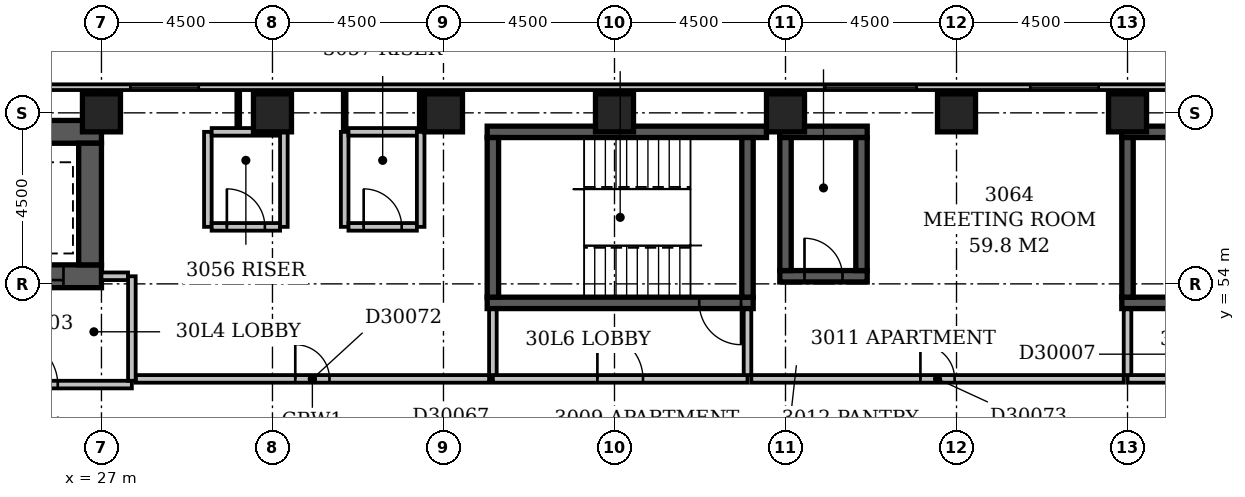
"""IFC4 building model, lengths in metres.
Left out: names, types, materials, properties, quantities, classifications, styles, units other than length and angle.
Written with IfcOpenShell. Run it as: python <this file> out.ifc"""

import sys

from ifc_helpers import new_model, si_unit, direction, frame, frame_2d, origin, origin_2d, place, context, subcontext, project, spatial, rectangle, extrude, element, fill, save


model = new_model("IFC4")
c1 = context("Model", 3, precision=1e-05, world=origin(), true_north=direction((0.0, 1.0)))
c2 = subcontext(c1, "Body", "Model", "MODEL_VIEW")
j1 = project(units=[si_unit("LENGTHUNIT", "METRE"), si_unit("PLANEANGLEUNIT", "RADIAN")], contexts=[c1])
p1 = place(None, origin())
s1 = spatial("IfcSite", under=j1, at=p1, CompositionType="ELEMENT")
p2 = place(p1, origin())
s2 = spatial("IfcBuilding", under=s1, at=p2, CompositionType="ELEMENT")
p3 = place(p2, frame((0.0, 0.0, 123.2)))
s3 = spatial("IfcBuildingStorey", under=s2, at=p3, CompositionType="ELEMENT", Elevation=123.2)
p4 = place(p3, frame((23.9, 54.2, -0.3), z_axis=(0.0, 0.0, 1.0), x_axis=(1.0, 0.0, 0.0)))
e1 = element("IfcWall", 1, at=p4, inside=s3, PredefinedType="SHEAR", context=c2, shape_type="SweptSolid", body=[
    extrude(rectangle(XDim=3.1, YDim=0.6, at=frame_2d((1.55, 0.0))), origin(), (0.0, 0.0, 1.0), 3.6),
])
p5 = place(p4, frame((1.0, 0.0, 0.3)))
e2 = element("IfcOpeningElement", 2, at=p5, cuts=e1, PredefinedType="OPENING", context=c2, shape_type="SweptSolid", body=[
    extrude(rectangle(XDim=1.1, YDim=2.1, at=frame_2d((0.55, 1.05))), frame((0.0, 0.312, 0.0), z_axis=(0.0, -1.0, 0.0), x_axis=(1.0, 0.0, 0.0)), (0.0, 0.0, 1.0), 0.624),
])
p6 = place(p3, frame((23.9, 58.0, -0.3), z_axis=(0.0, 0.0, 1.0), x_axis=(1.0, 0.0, 0.0)))
e3 = element("IfcWall", 3, at=p6, inside=s3, PredefinedType="SHEAR", context=c2, shape_type="SweptSolid", body=[
    extrude(rectangle(XDim=3.1, YDim=0.6, at=frame_2d((1.55, 0.0))), origin(), (0.0, 0.0, 1.0), 3.6),
])
p7 = place(p3, frame((26.7, 54.5, -0.3), z_axis=(0.0, 0.0, 1.0), x_axis=(0.0, 1.0, 0.0)))
e4 = element("IfcWall", 4, at=p7, inside=s3, PredefinedType="SHEAR", context=c2, shape_type="SweptSolid", body=[
    extrude(rectangle(XDim=3.2, YDim=0.6, at=frame_2d((1.6, 0.0))), origin(), (0.0, 0.0, 1.0), 3.6),
])
p8 = place(p3, frame((37.15, 53.5, -0.3), z_axis=(0.0, 0.0, 1.0), x_axis=(1.0, 0.0, 0.0)))
e5 = element("IfcWall", 5, at=p8, inside=s3, PredefinedType="SHEAR", context=c2, shape_type="SweptSolid", body=[
    extrude(rectangle(XDim=7.0, YDim=0.3, at=frame_2d((3.5, 0.0))), origin(), (0.0, 0.0, 1.0), 3.6),
])
p9 = place(p8, frame((5.58, 0.0, 0.3)))
e6 = element("IfcOpeningElement", 6, at=p9, cuts=e5, PredefinedType="OPENING", context=c2, shape_type="SweptSolid", body=[
    extrude(rectangle(XDim=1.1, YDim=2.1, at=frame_2d((0.55, 1.05))), frame((0.0, 0.162, 0.0), z_axis=(0.0, -1.0, 0.0), x_axis=(1.0, 0.0, 0.0)), (0.0, 0.0, 1.0), 0.324),
])
p10 = place(p3, frame((37.15, 58.0, -0.3), z_axis=(0.0, 0.0, 1.0), x_axis=(1.0, 0.0, 0.0)))
e7 = element("IfcWall", 7, at=p10, inside=s3, PredefinedType="SHEAR", context=c2, shape_type="SweptSolid", body=[
    extrude(rectangle(XDim=7.35, YDim=0.3, at=frame_2d((3.675, 0.0))), origin(), (0.0, 0.0, 1.0), 3.6),
])
for number, where, z_axis, x_axis in (
    (8, (37.3, 53.65, -0.3), (0.0, 0.0, 1.0), (0.0, 1.0, 0.0)),
    (9, (44.0, 53.65, -0.3), (0.0, 0.0, 1.0), (0.0, 1.0, 0.0)),
):
    element("IfcWall", number, at=place(p3, frame(where, z_axis=z_axis, x_axis=x_axis)), inside=s3, PredefinedType="SHEAR", context=c2, shape_type="SweptSolid", body=[
        extrude(rectangle(XDim=4.2, YDim=0.3, at=frame_2d((2.1, 0.0))), origin(), (0.0, 0.0, 1.0), 3.6),
    ])
p11 = place(p3, frame((44.85, 54.2, -0.3), z_axis=(0.0, 0.0, 1.0), x_axis=(1.0, 0.0, 0.0)))
e10 = element("IfcWall", 10, at=p11, inside=s3, PredefinedType="SHEAR", context=c2, shape_type="SweptSolid", body=[
    extrude(rectangle(XDim=2.3, YDim=0.3, at=frame_2d((1.15, 0.0))), origin(), (0.0, 0.0, 1.0), 3.6),
])
p12 = place(p11, frame((0.65, 0.0, 0.3)))
e11 = element("IfcOpeningElement", 11, at=p12, cuts=e10, PredefinedType="OPENING", context=c2, shape_type="SweptSolid", body=[
    extrude(rectangle(XDim=1.0, YDim=2.1, at=frame_2d((0.5, 1.05))), frame((0.0, 0.162, 0.0), z_axis=(0.0, -1.0, 0.0), x_axis=(1.0, 0.0, 0.0)), (0.0, 0.0, 1.0), 0.324),
])
p13 = place(p3, frame((44.85, 58.0, -0.3), z_axis=(0.0, 0.0, 1.0), x_axis=(1.0, 0.0, 0.0)))
e12 = element("IfcWall", 12, at=p13, inside=s3, PredefinedType="SHEAR", context=c2, shape_type="SweptSolid", body=[
    extrude(rectangle(XDim=2.3, YDim=0.3, at=frame_2d((1.15, 0.0))), origin(), (0.0, 0.0, 1.0), 3.6),
])
for number, where, z_axis, x_axis in (
    (13, (45.0, 54.35, -0.3), (0.0, 0.0, 1.0), (0.0, 1.0, 0.0)),
    (14, (47.0, 54.35, -0.3), (0.0, 0.0, 1.0), (0.0, 1.0, 0.0)),
):
    element("IfcWall", number, at=place(p3, frame(where, z_axis=z_axis, x_axis=x_axis)), inside=s3, PredefinedType="SHEAR", context=c2, shape_type="SweptSolid", body=[
        extrude(rectangle(XDim=3.5, YDim=0.3, at=frame_2d((1.75, 0.0))), origin(), (0.0, 0.0, 1.0), 3.6),
    ])
p14 = place(p3, frame((53.85, 53.5, -0.3), z_axis=(0.0, 0.0, 1.0), x_axis=(1.0, 0.0, 0.0)))
e15 = element("IfcWall", 15, at=p14, inside=s3, PredefinedType="SHEAR", context=c2, shape_type="SweptSolid", body=[
    extrude(rectangle(XDim=7.0, YDim=0.3, at=frame_2d((3.5, 0.0))), origin(), (0.0, 0.0, 1.0), 3.6),
])
p15 = place(p14, frame((5.58, 0.0, 0.3)))
e16 = element("IfcOpeningElement", 16, at=p15, cuts=e15, PredefinedType="OPENING", context=c2, shape_type="SweptSolid", body=[
    extrude(rectangle(XDim=1.1, YDim=2.1, at=frame_2d((0.55, 1.05))), frame((0.0, 0.162, 0.0), z_axis=(0.0, -1.0, 0.0), x_axis=(1.0, 0.0, 0.0)), (0.0, 0.0, 1.0), 0.324),
])
p16 = place(p3, frame((53.85, 58.0, -0.3), z_axis=(0.0, 0.0, 1.0), x_axis=(1.0, 0.0, 0.0)))
e17 = element("IfcWall", 17, at=p16, inside=s3, PredefinedType="SHEAR", context=c2, shape_type="SweptSolid", body=[
    extrude(rectangle(XDim=7.0, YDim=0.3, at=frame_2d((3.5, 0.0))), origin(), (0.0, 0.0, 1.0), 3.6),
])
p17 = place(p3, frame((54.0, 53.65, -0.3), z_axis=(0.0, 0.0, 1.0), x_axis=(0.0, 1.0, 0.0)))
e18 = element("IfcWall", 18, at=p17, inside=s3, PredefinedType="SHEAR", context=c2, shape_type="SweptSolid", body=[
    extrude(rectangle(XDim=4.2, YDim=0.3, at=frame_2d((2.1, 0.0))), origin(), (0.0, 0.0, 1.0), 3.6),
])
for number, where, z_axis, x_axis in (
    (19, (27.0, 58.5, -0.3), (0.0, 0.0, 1.0), (1.0, 0.0, 0.0)),
    (20, (31.5, 58.5, -0.3), (0.0, 0.0, 1.0), (1.0, 0.0, 0.0)),
    (21, (36.0, 58.5, -0.3), (0.0, 0.0, 1.0), (1.0, 0.0, 0.0)),
    (22, (40.5, 58.5, -0.3), (0.0, 0.0, 1.0), (1.0, 0.0, 0.0)),
    (23, (45.0, 58.5, -0.3), (0.0, 0.0, 1.0), (1.0, 0.0, 0.0)),
    (24, (49.5, 58.5, -0.3), (0.0, 0.0, 1.0), (1.0, 0.0, 0.0)),
    (25, (54.0, 58.5, -0.3), (0.0, 0.0, 1.0), (1.0, 0.0, 0.0)),
):
    element("IfcColumn", number, at=place(p3, frame(where, z_axis=z_axis, x_axis=x_axis)), inside=s3, PredefinedType="COLUMN", context=c2, shape_type="SweptSolid", body=[
        extrude(rectangle(XDim=1.0, YDim=1.0, at=origin_2d()), origin(), (0.0, 0.0, 1.0), 3.6),
    ])
p18 = place(p3, frame((68.1, 59.175, 0.0), z_axis=(0.0, 0.0, 1.0), x_axis=(-1.0, 0.0, 0.0)))
e26 = element("IfcWall", 26, at=p18, inside=s3, PredefinedType="STANDARD", context=c2, shape_type="SweptSolid", body=[
    extrude(rectangle(XDim=68.85, YDim=0.15, at=frame_2d((34.425, 0.0))), origin(), (0.0, 0.0, 1.0), 2.7),
])
p19 = place(p18, frame((1.65, 0.0, 0.6)))
e27 = element("IfcOpeningElement", 27, at=p19, cuts=e26, PredefinedType="OPENING", context=c2, shape_type="SweptSolid", body=[
    extrude(rectangle(XDim=2.4, YDim=1.8, at=frame_2d((1.2, 0.9))), frame((0.0, 0.087, 0.0), z_axis=(0.0, -1.0, 0.0), x_axis=(1.0, 0.0, 0.0)), (0.0, 0.0, 1.0), 0.174),
])
p20 = place(p18, frame((6.15, 0.0, 0.6)))
e28 = element("IfcOpeningElement", 28, at=p20, cuts=e26, PredefinedType="OPENING", context=c2, shape_type="SweptSolid", body=[
    extrude(rectangle(XDim=2.4, YDim=1.8, at=frame_2d((1.2, 0.9))), frame((0.0, 0.087, 0.0), z_axis=(0.0, -1.0, 0.0), x_axis=(1.0, 0.0, 0.0)), (0.0, 0.0, 1.0), 0.174),
])
p21 = place(p18, frame((14.86, 0.0, 0.6)))
e29 = element("IfcOpeningElement", 29, at=p21, cuts=e26, PredefinedType="OPENING", context=c2, shape_type="SweptSolid", body=[
    extrude(rectangle(XDim=1.8, YDim=1.8, at=frame_2d((0.9, 0.9))), frame((0.0, 0.087, 0.0), z_axis=(0.0, -1.0, 0.0), x_axis=(1.0, 0.0, 0.0)), (0.0, 0.0, 1.0), 0.174),
])
p22 = place(p18, frame((19.65, 0.0, 0.6)))
e30 = element("IfcOpeningElement", 30, at=p22, cuts=e26, PredefinedType="OPENING", context=c2, shape_type="SweptSolid", body=[
    extrude(rectangle(XDim=2.4, YDim=1.8, at=frame_2d((1.2, 0.9))), frame((0.0, 0.087, 0.0), z_axis=(0.0, -1.0, 0.0), x_axis=(1.0, 0.0, 0.0)), (0.0, 0.0, 1.0), 0.174),
])
p23 = place(p18, frame((38.54, 0.0, 0.6)))
e31 = element("IfcOpeningElement", 31, at=p23, cuts=e26, PredefinedType="OPENING", context=c2, shape_type="SweptSolid", body=[
    extrude(rectangle(XDim=1.8, YDim=1.8, at=frame_2d((0.9, 0.9))), frame((0.0, 0.087, 0.0), z_axis=(0.0, -1.0, 0.0), x_axis=(1.0, 0.0, 0.0)), (0.0, 0.0, 1.0), 0.174),
])
p24 = place(p3, frame((23.0, 51.35, 0.0), z_axis=(0.0, 0.0, 1.0), x_axis=(1.0, 0.0, 0.0)))
e32 = element("IfcWall", 32, at=p24, inside=s3, PredefinedType="PARTITIONING", context=c2, shape_type="SweptSolid", body=[
    extrude(rectangle(XDim=4.8, YDim=0.2, at=frame_2d((2.4, 0.0))), origin(), (0.0, 0.0, 1.0), 3.3),
])
p25 = place(p24, frame((1.65, 0.0, 0.0)))
e33 = element("IfcOpeningElement", 33, at=p25, cuts=e32, PredefinedType="OPENING", context=c2, shape_type="SweptSolid", body=[
    extrude(rectangle(XDim=1.2, YDim=2.1, at=frame_2d((0.6, 1.05))), frame((0.0, 0.112, 0.0), z_axis=(0.0, -1.0, 0.0), x_axis=(1.0, 0.0, 0.0)), (0.0, 0.0, 1.0), 0.224),
])
p26 = place(p3, frame((27.8, 51.45, 0.0), z_axis=(0.0, 0.0, 1.0), x_axis=(0.0, 1.0, 0.0)))
e34 = element("IfcWall", 34, at=p26, inside=s3, PredefinedType="PARTITIONING", context=c2, shape_type="SweptSolid", body=[
    extrude(rectangle(XDim=2.75, YDim=0.2, at=frame_2d((1.375, 0.0))), origin(), (0.0, 0.0, 1.0), 3.3),
])
p27 = place(p3, frame((27.0, 54.2, 0.0), z_axis=(0.0, 0.0, 1.0), x_axis=(1.0, 0.0, 0.0)))
e35 = element("IfcWall", 35, at=p27, inside=s3, PredefinedType="PARTITIONING", context=c2, shape_type="SweptSolid", body=[
    extrude(rectangle(XDim=0.7, YDim=0.2, at=frame_2d((0.35, 0.0))), origin(), (0.0, 0.0, 1.0), 3.3),
])
p28 = place(p3, frame((37.3, 51.5, 0.0), z_axis=(0.0, 0.0, 1.0), x_axis=(1.0, 0.0, 0.0)))
e36 = element("IfcWall", 36, at=p28, inside=s3, PredefinedType="PARTITIONING", context=c2, shape_type="SweptSolid", body=[
    extrude(rectangle(XDim=6.7, YDim=0.2, at=frame_2d((3.35, 0.0))), origin(), (0.0, 0.0, 1.0), 3.3),
])
p29 = place(p28, frame((2.75, 0.0, 0.0)))
e37 = element("IfcOpeningElement", 37, at=p29, cuts=e36, PredefinedType="OPENING", context=c2, shape_type="SweptSolid", body=[
    extrude(rectangle(XDim=1.2, YDim=2.1, at=frame_2d((0.6, 1.05))), frame((0.0, 0.112, 0.0), z_axis=(0.0, -1.0, 0.0), x_axis=(1.0, 0.0, 0.0)), (0.0, 0.0, 1.0), 0.224),
])
for number, where, z_axis, x_axis in (
    (38, (44.0, 51.6, 0.0), (0.0, 0.0, 1.0), (0.0, 1.0, 0.0)),
    (39, (37.3, 51.6, 0.0), (0.0, 0.0, 1.0), (0.0, 1.0, 0.0)),
):
    element("IfcWall", number, at=place(p3, frame(where, z_axis=z_axis, x_axis=x_axis)), inside=s3, PredefinedType="PARTITIONING", context=c2, shape_type="SweptSolid", body=[
        extrude(rectangle(XDim=1.73, YDim=0.2, at=frame_2d((0.865, 0.0))), origin(), (0.0, 0.0, 1.0), 3.3),
    ])
p30 = place(p3, frame((54.0, 51.5, 0.0), z_axis=(0.0, 0.0, 1.0), x_axis=(1.0, 0.0, 0.0)))
e40 = element("IfcWall", 40, at=p30, inside=s3, PredefinedType="PARTITIONING", context=c2, shape_type="SweptSolid", body=[
    extrude(rectangle(XDim=6.7, YDim=0.2, at=frame_2d((3.35, 0.0))), origin(), (0.0, 0.0, 1.0), 3.3),
])
p31 = place(p30, frame((2.75, 0.0, 0.0)))
e41 = element("IfcOpeningElement", 41, at=p31, cuts=e40, PredefinedType="OPENING", context=c2, shape_type="SweptSolid", body=[
    extrude(rectangle(XDim=1.2, YDim=2.1, at=frame_2d((0.6, 1.05))), frame((0.0, 0.112, 0.0), z_axis=(0.0, -1.0, 0.0), x_axis=(1.0, 0.0, 0.0)), (0.0, 0.0, 1.0), 0.224),
])
p32 = place(p3, frame((54.0, 51.6, 0.0), z_axis=(0.0, 0.0, 1.0), x_axis=(0.0, 1.0, 0.0)))
e42 = element("IfcWall", 42, at=p32, inside=s3, PredefinedType="PARTITIONING", context=c2, shape_type="SweptSolid", body=[
    extrude(rectangle(XDim=1.73, YDim=0.2, at=frame_2d((0.865, 0.0))), origin(), (0.0, 0.0, 1.0), 2.6),
])
p33 = place(p3, frame((27.9, 51.5, 0.0), z_axis=(0.0, 0.0, 1.0), x_axis=(1.0, 0.0, 0.0)))
e43 = element("IfcWall", 43, at=p33, inside=s3, PredefinedType="PARTITIONING", context=c2, shape_type="SweptSolid", body=[
    extrude(rectangle(XDim=9.3, YDim=0.2, at=frame_2d((4.65, 0.0))), origin(), (0.0, 0.0, 1.0), 3.3),
])
p34 = place(p33, frame((4.2, 0.0, 0.0)))
e44 = element("IfcOpeningElement", 44, at=p34, cuts=e43, PredefinedType="OPENING", context=c2, shape_type="SweptSolid", body=[
    extrude(rectangle(XDim=0.9, YDim=2.1, at=frame_2d((0.45, 1.05))), frame((0.0, 0.112, 0.0), z_axis=(0.0, -1.0, 0.0), x_axis=(1.0, 0.0, 0.0)), (0.0, 0.0, 1.0), 0.224),
])
p35 = place(p3, frame((44.1, 51.5, 0.0), z_axis=(0.0, 0.0, 1.0), x_axis=(1.0, 0.0, 0.0)))
e45 = element("IfcWall", 45, at=p35, inside=s3, PredefinedType="PARTITIONING", context=c2, shape_type="SweptSolid", body=[
    extrude(rectangle(XDim=9.8, YDim=0.2, at=frame_2d((4.9, 0.0))), origin(), (0.0, 0.0, 1.0), 3.3),
])
p36 = place(p35, frame((4.45, 0.0, 0.0)))
e46 = element("IfcOpeningElement", 46, at=p36, cuts=e45, PredefinedType="OPENING", context=c2, shape_type="SweptSolid", body=[
    extrude(rectangle(XDim=0.9, YDim=2.1, at=frame_2d((0.45, 1.05))), frame((0.0, 0.112, 0.0), z_axis=(0.0, -1.0, 0.0), x_axis=(1.0, 0.0, 0.0)), (0.0, 0.0, 1.0), 0.224),
])
p37 = place(p3, frame((29.8, 55.5, 0.0), z_axis=(0.0, 0.0, 1.0), x_axis=(0.0, 1.0, 0.0)))
e47 = element("IfcWall", 47, at=p37, inside=s3, PredefinedType="PARTITIONING", context=c2, shape_type="SweptSolid", body=[
    extrude(rectangle(XDim=2.5, YDim=0.2, at=frame_2d((1.25, 0.0))), origin(), (0.0, 0.0, 1.0), 3.3),
])
p38 = place(p3, frame((29.9, 55.5, 0.0), z_axis=(0.0, 0.0, 1.0), x_axis=(1.0, 0.0, 0.0)))
e48 = element("IfcWall", 48, at=p38, inside=s3, PredefinedType="PARTITIONING", context=c2, shape_type="SweptSolid", body=[
    extrude(rectangle(XDim=1.8, YDim=0.2, at=frame_2d((0.9, 0.0))), origin(), (0.0, 0.0, 1.0), 3.3),
])
p39 = place(p38, frame((0.4, 0.0, 0.0)))
e49 = element("IfcOpeningElement", 49, at=p39, cuts=e48, PredefinedType="OPENING", context=c2, shape_type="SweptSolid", body=[
    extrude(rectangle(XDim=1.0, YDim=2.1, at=frame_2d((0.5, 1.05))), frame((0.0, 0.112, 0.0), z_axis=(0.0, -1.0, 0.0), x_axis=(1.0, 0.0, 0.0)), (0.0, 0.0, 1.0), 0.224),
])
for number, where, z_axis, x_axis in (
    (50, (31.8, 55.5, 0.0), (0.0, 0.0, 1.0), (0.0, 1.0, 0.0)),
    (51, (33.4, 55.5, 0.0), (0.0, 0.0, 1.0), (0.0, 1.0, 0.0)),
):
    element("IfcWall", number, at=place(p3, frame(where, z_axis=z_axis, x_axis=x_axis)), inside=s3, PredefinedType="PARTITIONING", context=c2, shape_type="SweptSolid", body=[
        extrude(rectangle(XDim=2.5, YDim=0.2, at=frame_2d((1.25, 0.0))), origin(), (0.0, 0.0, 1.0), 3.3),
    ])
p40 = place(p3, frame((33.5, 55.5, 0.0), z_axis=(0.0, 0.0, 1.0), x_axis=(1.0, 0.0, 0.0)))
e52 = element("IfcWall", 52, at=p40, inside=s3, PredefinedType="PARTITIONING", context=c2, shape_type="SweptSolid", body=[
    extrude(rectangle(XDim=1.8, YDim=0.2, at=frame_2d((0.9, 0.0))), origin(), (0.0, 0.0, 1.0), 3.3),
])
p41 = place(p40, frame((0.4, 0.0, 0.0)))
e53 = element("IfcOpeningElement", 53, at=p41, cuts=e52, PredefinedType="OPENING", context=c2, shape_type="SweptSolid", body=[
    extrude(rectangle(XDim=1.0, YDim=2.1, at=frame_2d((0.5, 1.05))), frame((0.0, 0.112, 0.0), z_axis=(0.0, -1.0, 0.0), x_axis=(1.0, 0.0, 0.0)), (0.0, 0.0, 1.0), 0.224),
])
p42 = place(p3, frame((35.4, 55.5, 0.0), z_axis=(0.0, 0.0, 1.0), x_axis=(0.0, 1.0, 0.0)))
e54 = element("IfcWall", 54, at=p42, inside=s3, PredefinedType="PARTITIONING", context=c2, shape_type="SweptSolid", body=[
    extrude(rectangle(XDim=2.5, YDim=0.2, at=frame_2d((1.25, 0.0))), origin(), (0.0, 0.0, 1.0), 2.4),
])
p43 = place(p3, frame((29.9, 58.0, 0.0), z_axis=(0.0, 0.0, 1.0), x_axis=(1.0, 0.0, 0.0)))
e55 = element("IfcWall", 55, at=p43, inside=s3, PredefinedType="PARTITIONING", context=c2, shape_type="SweptSolid", body=[
    extrude(rectangle(XDim=1.8, YDim=0.2, at=frame_2d((0.9, 0.0))), origin(), (0.0, 0.0, 1.0), 3.3),
])
p44 = place(p3, frame((33.4, 58.0, 0.0), z_axis=(0.0, 0.0, 1.0), x_axis=(0.0, 1.0, 0.0)))
e56 = element("IfcWall", 56, at=p44, inside=s3, PredefinedType="PARTITIONING", context=c2, shape_type="SweptSolid", body=[
    extrude(rectangle(XDim=1.1, YDim=0.1, at=frame_2d((0.55, 0.0))), origin(), (0.0, 0.0, 1.0), 3.3),
])
p45 = place(p3, frame((33.5, 58.0, 0.0), z_axis=(0.0, 0.0, 1.0), x_axis=(1.0, 0.0, 0.0)))
e57 = element("IfcWall", 57, at=p45, inside=s3, PredefinedType="PARTITIONING", context=c2, shape_type="SweptSolid", body=[
    extrude(rectangle(XDim=1.8, YDim=0.2, at=frame_2d((0.9, 0.0))), origin(), (0.0, 0.0, 1.0), 3.3),
])
p46 = place(p3, frame((35.4, 58.0, 0.0), z_axis=(0.0, 0.0, 1.0), x_axis=(0.0, 1.0, 0.0)))
e58 = element("IfcWall", 58, at=p46, inside=s3, PredefinedType="PARTITIONING", context=c2, shape_type="SweptSolid", body=[
    extrude(rectangle(XDim=1.1, YDim=0.1, at=frame_2d((0.55, 0.0))), origin(), (0.0, 0.0, 1.0), 2.4),
])
p47 = place(p3, frame((30.6, 58.1, 0.0), z_axis=(0.0, 0.0, 1.0), x_axis=(0.0, 1.0, 0.0)))
e59 = element("IfcWall", 59, at=p47, inside=s3, PredefinedType="PARTITIONING", context=c2, shape_type="SweptSolid", body=[
    extrude(rectangle(XDim=1.0, YDim=0.1, at=frame_2d((0.5, 0.0))), origin(), (0.0, 0.0, 1.0), 3.3),
])
p48 = place(p21, origin())
e60 = element("IfcWindow", 60, at=p48, inside=s3, PartitioningType="SINGLE_PANEL", PredefinedType="WINDOW", context=c2, shape_type="SweptSolid", body=[
    extrude(rectangle(XDim=1.8, YDim=1.8, at=frame_2d((0.9, 0.9))), frame((0.0, 0.03, 0.0), z_axis=(0.0, -1.0, 0.0), x_axis=(1.0, 0.0, 0.0)), (0.0, 0.0, 1.0), 0.06),
])
fill(e29, e60)
p49 = place(p22, origin())
e61 = element("IfcWindow", 61, at=p49, inside=s3, PartitioningType="SINGLE_PANEL", PredefinedType="WINDOW", context=c2, shape_type="SweptSolid", body=[
    extrude(rectangle(XDim=2.4, YDim=1.8, at=frame_2d((1.2, 0.9))), frame((0.0, 0.03, 0.0), z_axis=(0.0, -1.0, 0.0), x_axis=(1.0, 0.0, 0.0)), (0.0, 0.0, 1.0), 0.06),
])
fill(e30, e61)
p50 = place(p23, origin())
e62 = element("IfcWindow", 62, at=p50, inside=s3, PartitioningType="SINGLE_PANEL", PredefinedType="WINDOW", context=c2, shape_type="SweptSolid", body=[
    extrude(rectangle(XDim=1.8, YDim=1.8, at=frame_2d((0.9, 0.9))), frame((0.0, 0.03, 0.0), z_axis=(0.0, -1.0, 0.0), x_axis=(1.0, 0.0, 0.0)), (0.0, 0.0, 1.0), 0.06),
])
fill(e31, e62)
p51 = place(p25, origin())
e63 = element("IfcDoor", 63, at=p51, inside=s3, OperationType="SINGLE_SWING_LEFT", PredefinedType="DOOR", context=c2, shape_type="SweptSolid", body=[
    extrude(rectangle(XDim=1.2, YDim=2.1, at=frame_2d((0.6, 1.05))), frame((0.0, 0.025, 0.0), z_axis=(0.0, -1.0, 0.0), x_axis=(1.0, 0.0, 0.0)), (0.0, 0.0, 1.0), 0.05),
])
fill(e33, e63)
p52 = place(p5, origin())
e64 = element("IfcDoor", 64, at=p52, inside=s3, OperationType="SLIDING_TO_LEFT", PredefinedType="DOOR", context=c2, shape_type="SweptSolid", body=[
    extrude(rectangle(XDim=1.1, YDim=2.1, at=frame_2d((0.55, 1.05))), frame((0.0, 0.025, 0.0), z_axis=(0.0, -1.0, 0.0), x_axis=(1.0, 0.0, 0.0)), (0.0, 0.0, 1.0), 0.05),
])
fill(e2, e64)
p53 = place(p29, origin())
e65 = element("IfcDoor", 65, at=p53, inside=s3, OperationType="SINGLE_SWING_LEFT", PredefinedType="DOOR", context=c2, shape_type="SweptSolid", body=[
    extrude(rectangle(XDim=1.2, YDim=2.1, at=frame_2d((0.6, 1.05))), frame((0.0, 0.025, 0.0), z_axis=(0.0, -1.0, 0.0), x_axis=(1.0, 0.0, 0.0)), (0.0, 0.0, 1.0), 0.05),
])
fill(e37, e65)
p54 = place(p12, origin())
e66 = element("IfcDoor", 66, at=p54, inside=s3, OperationType="SINGLE_SWING_LEFT", PredefinedType="DOOR", context=c2, shape_type="SweptSolid", body=[
    extrude(rectangle(XDim=1.0, YDim=2.1, at=frame_2d((0.5, 1.05))), frame((0.0, 0.025, 0.0), z_axis=(0.0, -1.0, 0.0), x_axis=(1.0, 0.0, 0.0)), (0.0, 0.0, 1.0), 0.05),
])
fill(e11, e66)
p55 = place(p9, origin())
e67 = element("IfcDoor", 67, at=p55, inside=s3, OperationType="SINGLE_SWING_RIGHT", PredefinedType="DOOR", context=c2, shape_type="SweptSolid", body=[
    extrude(rectangle(XDim=1.1, YDim=2.1, at=frame_2d((0.55, 1.05))), frame((0.0, 0.025, 0.0), z_axis=(0.0, -1.0, 0.0), x_axis=(1.0, 0.0, 0.0)), (0.0, 0.0, 1.0), 0.05),
])
fill(e6, e67)
p56 = place(p34, origin())
e68 = element("IfcDoor", 68, at=p56, inside=s3, OperationType="SINGLE_SWING_LEFT", PredefinedType="DOOR", context=c2, shape_type="SweptSolid", body=[
    extrude(rectangle(XDim=0.9, YDim=2.1, at=frame_2d((0.45, 1.05))), frame((0.0, 0.025, 0.0), z_axis=(0.0, -1.0, 0.0), x_axis=(1.0, 0.0, 0.0)), (0.0, 0.0, 1.0), 0.05),
])
fill(e44, e68)
p57 = place(p36, origin())
e69 = element("IfcDoor", 69, at=p57, inside=s3, OperationType="SINGLE_SWING_LEFT", PredefinedType="DOOR", context=c2, shape_type="SweptSolid", body=[
    extrude(rectangle(XDim=0.9, YDim=2.1, at=frame_2d((0.45, 1.05))), frame((0.0, 0.025, 0.0), z_axis=(0.0, -1.0, 0.0), x_axis=(1.0, 0.0, 0.0)), (0.0, 0.0, 1.0), 0.05),
])
fill(e46, e69)
p58 = place(p39, origin())
e70 = element("IfcDoor", 70, at=p58, inside=s3, OperationType="SINGLE_SWING_LEFT", PredefinedType="DOOR", context=c2, shape_type="SweptSolid", body=[
    extrude(rectangle(XDim=1.0, YDim=2.1, at=frame_2d((0.5, 1.05))), frame((0.0, 0.025, 0.0), z_axis=(0.0, -1.0, 0.0), x_axis=(1.0, 0.0, 0.0)), (0.0, 0.0, 1.0), 0.05),
])
fill(e49, e70)
p59 = place(p41, origin())
e71 = element("IfcDoor", 71, at=p59, inside=s3, OperationType="SINGLE_SWING_LEFT", PredefinedType="DOOR", context=c2, shape_type="SweptSolid", body=[
    extrude(rectangle(XDim=1.0, YDim=2.1, at=frame_2d((0.5, 1.05))), frame((0.0, 0.025, 0.0), z_axis=(0.0, -1.0, 0.0), x_axis=(1.0, 0.0, 0.0)), (0.0, 0.0, 1.0), 0.05),
])
fill(e53, e71)
save(model, sys.argv[1])
